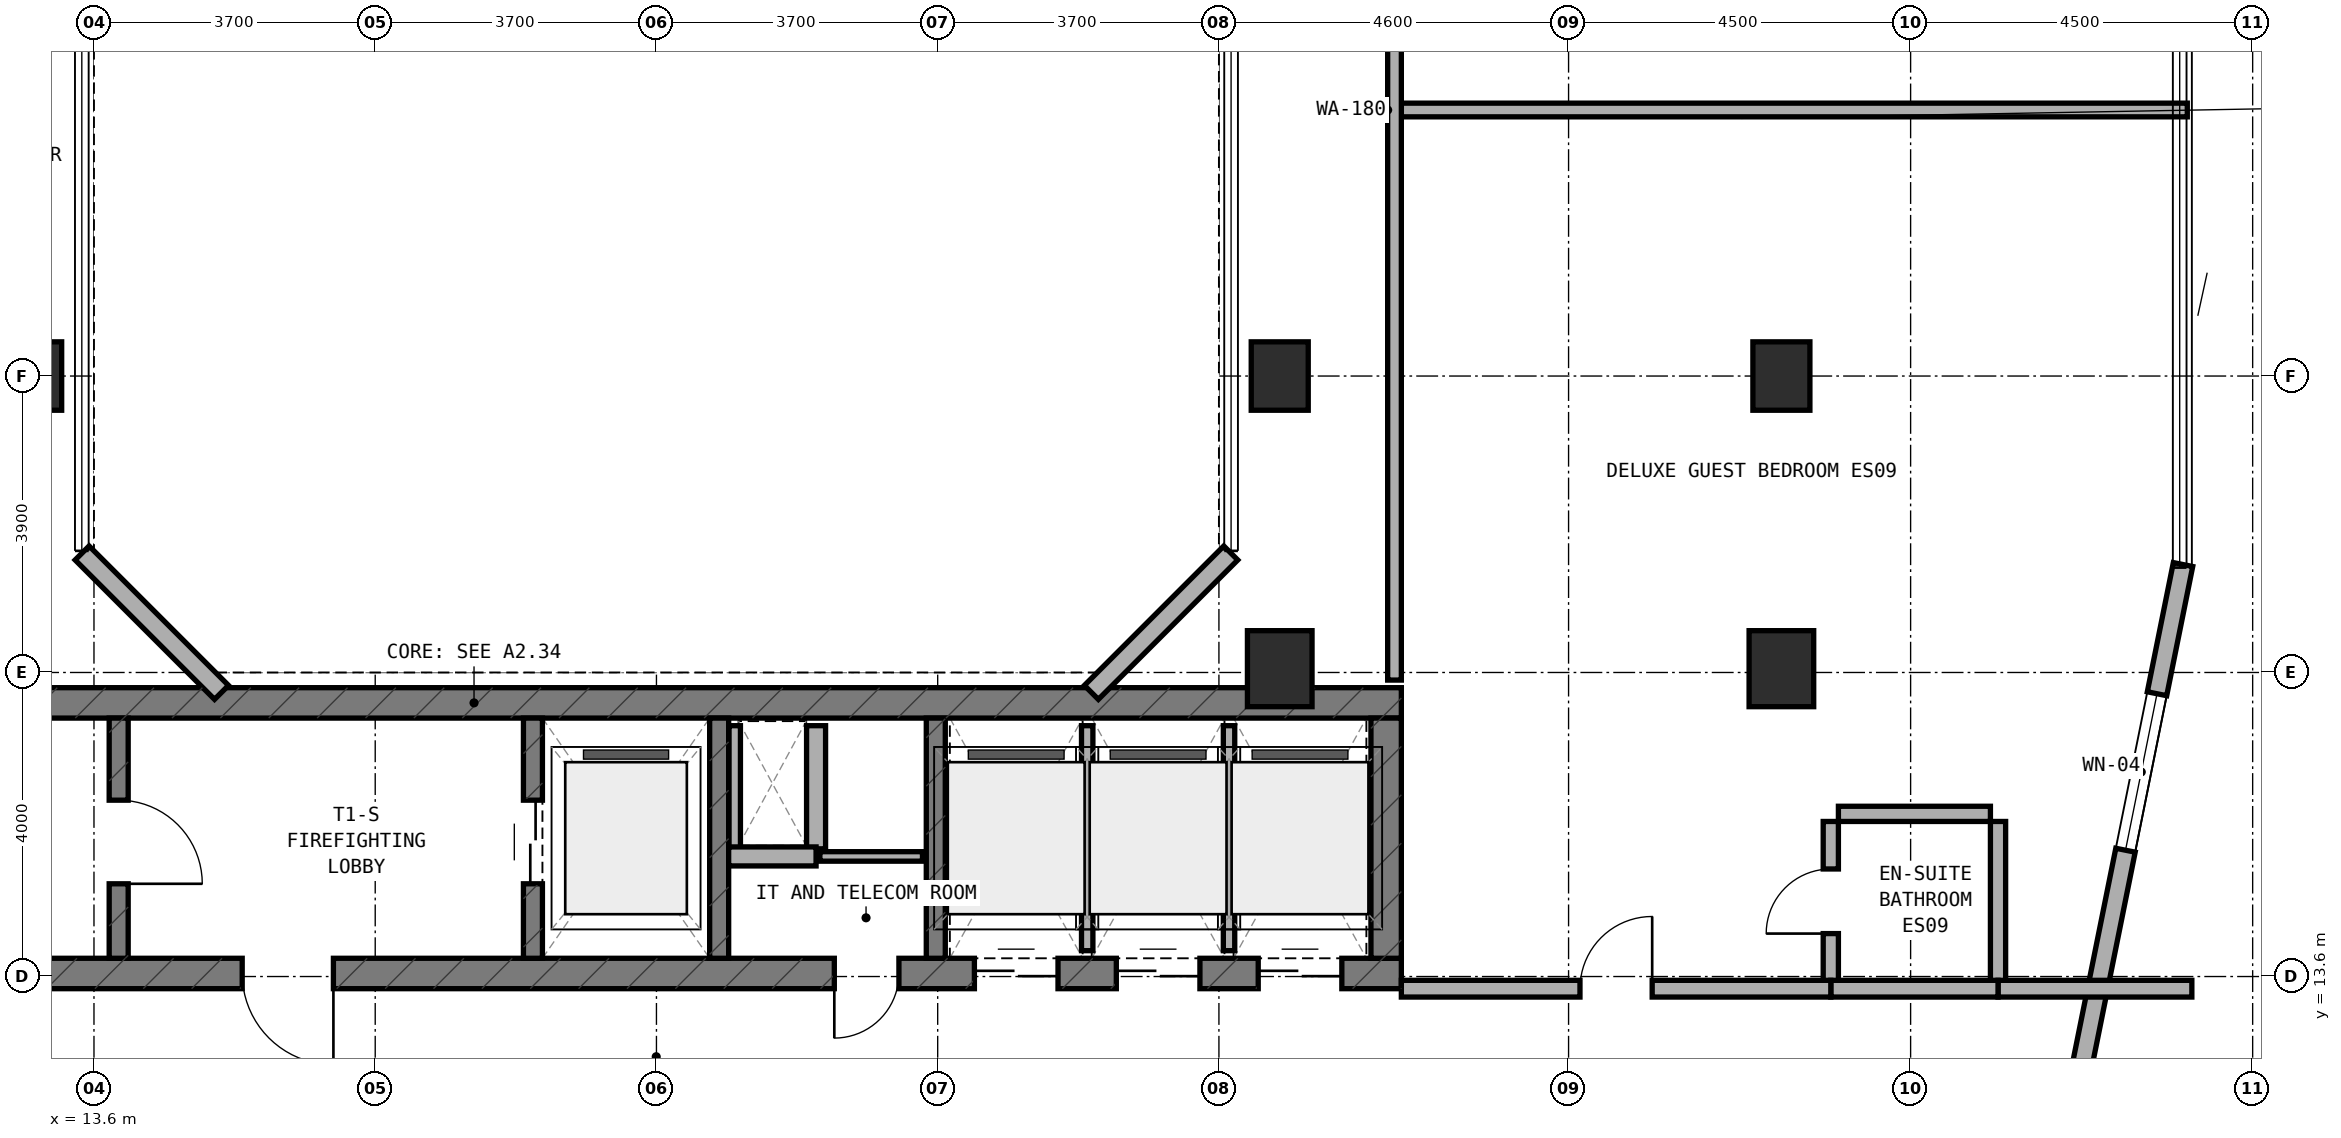
"""IFC4 building model, lengths in metres.
Left out: names, types, materials, properties, quantities, classifications, styles, units other than length and angle.
Written with IfcOpenShell. Run it as: python <this file> out.ifc"""

import sys

from ifc_helpers import new_model, si_unit, direction, frame, frame_2d, origin, origin_2d, place, context, subcontext, project, spatial, rectangle, extrude, element, fill, save


model = new_model("IFC4")
c1 = context("Model", 3, precision=1e-05, world=origin(), true_north=direction((0.0, 1.0)))
c2 = subcontext(c1, "Body", "Model", "MODEL_VIEW")
j1 = project(units=[si_unit("LENGTHUNIT", "METRE"), si_unit("PLANEANGLEUNIT", "RADIAN")], contexts=[c1])
p1 = place(None, origin())
s1 = spatial("IfcSite", under=j1, at=p1, CompositionType="ELEMENT")
p2 = place(p1, origin())
s2 = spatial("IfcBuilding", under=s1, at=p2, CompositionType="ELEMENT")
p3 = place(p2, frame((0.0, 0.0, 152.0)))
s3 = spatial("IfcBuildingStorey", under=s2, at=p3, CompositionType="ELEMENT", Elevation=152.0)
p4 = place(p3, frame((6.4, 13.64, 0.0), z_axis=(0.0, 0.0, 1.0), x_axis=(1.0, 0.0, 0.0)))
e1 = element("IfcWall", 1, at=p4, inside=s3, PredefinedType="SHEAR", context=c2, shape_type="SweptSolid", body=[
    extrude(rectangle(XDim=24.4, YDim=0.4, at=frame_2d((12.2, 0.0))), origin(), (0.0, 0.0, 1.0), 3.5),
])
p5 = place(p4, frame((9.15, 0.0, 0.0)))
e2 = element("IfcOpeningElement", 2, at=p5, cuts=e1, PredefinedType="OPENING", context=c2, shape_type="SweptSolid", body=[
    extrude(rectangle(XDim=1.2, YDim=2.15, at=frame_2d((0.6, 1.075))), frame((0.0, 0.21, 0.0), z_axis=(0.0, -1.0, 0.0), x_axis=(1.0, 0.0, 0.0)), (0.0, 0.0, 1.0), 0.42),
])
p6 = place(p4, frame((16.94, 0.0, 0.0)))
e3 = element("IfcOpeningElement", 3, at=p6, cuts=e1, PredefinedType="OPENING", context=c2, shape_type="SweptSolid", body=[
    extrude(rectangle(XDim=0.85, YDim=2.1, at=frame_2d((0.425, 1.05))), frame((0.0, 0.21, 0.0), z_axis=(0.0, -1.0, 0.0), x_axis=(1.0, 0.0, 0.0)), (0.0, 0.0, 1.0), 0.42),
])
p7 = place(p4, frame((18.783, 0.0, 0.0)))
e4 = element("IfcOpeningElement", 4, at=p7, cuts=e1, PredefinedType="OPENING", context=c2, shape_type="SweptSolid", body=[
    extrude(rectangle(XDim=1.1, YDim=2.15, at=frame_2d((0.55, 1.075))), frame((0.0, 0.21, 0.0), z_axis=(0.0, -1.0, 0.0), x_axis=(1.0, 0.0, 0.0)), (0.0, 0.0, 1.0), 0.42),
])
p8 = place(p4, frame((20.65, 0.0, 0.0)))
e5 = element("IfcOpeningElement", 5, at=p8, cuts=e1, PredefinedType="OPENING", context=c2, shape_type="SweptSolid", body=[
    extrude(rectangle(XDim=1.1, YDim=2.15, at=frame_2d((0.55, 1.075))), frame((0.0, 0.21, 0.0), z_axis=(0.0, -1.0, 0.0), x_axis=(1.0, 0.0, 0.0)), (0.0, 0.0, 1.0), 0.42),
])
p9 = place(p4, frame((22.517, 0.0, 0.0)))
e6 = element("IfcOpeningElement", 6, at=p9, cuts=e1, PredefinedType="OPENING", context=c2, shape_type="SweptSolid", body=[
    extrude(rectangle(XDim=1.1, YDim=2.15, at=frame_2d((0.55, 1.075))), frame((0.0, 0.21, 0.0), z_axis=(0.0, -1.0, 0.0), x_axis=(1.0, 0.0, 0.0)), (0.0, 0.0, 1.0), 0.42),
])
p10 = place(p3, frame((6.4, 17.2, 0.0), z_axis=(0.0, 0.0, 1.0), x_axis=(1.0, 0.0, 0.0)))
e7 = element("IfcWall", 7, at=p10, inside=s3, PredefinedType="SHEAR", context=c2, shape_type="SweptSolid", body=[
    extrude(rectangle(XDim=24.4, YDim=0.4, at=frame_2d((12.2, 0.0))), origin(), (0.0, 0.0, 1.0), 3.5),
])
p11 = place(p3, frame((30.6, 13.84, 0.0), z_axis=(0.0, 0.0, 1.0), x_axis=(0.0, 1.0, 0.0)))
e8 = element("IfcWall", 8, at=p11, inside=s3, PredefinedType="SHEAR", context=c2, shape_type="SweptSolid", body=[
    extrude(rectangle(XDim=3.16, YDim=0.4, at=frame_2d((1.58, 0.0))), origin(), (0.0, 0.0, 1.0), 3.5),
])
p12 = place(p3, frame((13.925, 13.84, 0.0), z_axis=(0.0, 0.0, 1.0), x_axis=(0.0, 1.0, 0.0)))
e9 = element("IfcWall", 9, at=p12, inside=s3, PredefinedType="STANDARD", context=c2, shape_type="SweptSolid", body=[
    extrude(rectangle(XDim=3.16, YDim=0.25, at=frame_2d((1.58, 0.0))), origin(), (0.0, 0.0, 1.0), 3.22),
])
p13 = place(p12, frame((0.98, 0.0, 0.0)))
e10 = element("IfcOpeningElement", 10, at=p13, cuts=e9, PredefinedType="OPENING", context=c2, shape_type="SweptSolid", body=[
    extrude(rectangle(XDim=1.1, YDim=2.15, at=frame_2d((0.55, 1.075))), frame((0.0, 0.135, 0.0), z_axis=(0.0, -1.0, 0.0), x_axis=(1.0, 0.0, 0.0)), (0.0, 0.0, 1.0), 0.27),
])
p14 = place(p3, frame((19.375, 13.84, 0.0), z_axis=(0.0, 0.0, 1.0), x_axis=(0.0, 1.0, 0.0)))
e11 = element("IfcWall", 11, at=p14, inside=s3, PredefinedType="STANDARD", context=c2, shape_type="SweptSolid", body=[
    extrude(rectangle(XDim=3.16, YDim=0.25, at=frame_2d((1.58, 0.0))), origin(), (0.0, 0.0, 1.0), 3.22),
])
p15 = place(p14, frame((0.98, 0.0, 0.0)))
e12 = element("IfcOpeningElement", 12, at=p15, cuts=e11, PredefinedType="OPENING", context=c2, shape_type="SweptSolid", body=[
    extrude(rectangle(XDim=1.1, YDim=2.15, at=frame_2d((0.55, 1.075))), frame((0.0, 0.135, 0.0), z_axis=(0.0, -1.0, 0.0), x_axis=(1.0, 0.0, 0.0)), (0.0, 0.0, 1.0), 0.27),
])
for number, where, z_axis, x_axis in (
    (13, (21.825, 13.84, 0.0), (0.0, 0.0, 1.0), (0.0, 1.0, 0.0)),
    (14, (24.675, 13.84, 0.0), (0.0, 0.0, 1.0), (0.0, 1.0, 0.0)),
):
    element("IfcWall", number, at=place(p3, frame(where, z_axis=z_axis, x_axis=x_axis)), inside=s3, PredefinedType="STANDARD", context=c2, shape_type="SweptSolid", body=[
        extrude(rectangle(XDim=3.16, YDim=0.25, at=frame_2d((1.58, 0.0))), origin(), (0.0, 0.0, 1.0), 3.22),
    ])
p16 = place(p3, frame((35.8, 21.5, 0.0), z_axis=(0.0, 0.0, 1.0), x_axis=(1.0, 0.0, 0.0)))
e15 = element("IfcColumn", 15, at=p16, inside=s3, PredefinedType="COLUMN", context=c2, shape_type="SweptSolid", body=[
    extrude(rectangle(XDim=0.75, YDim=0.9, at=origin_2d()), origin(), (0.0, 0.0, 1.0), 3.5),
])
p17 = place(p3, frame((35.8, 17.65, 0.0), z_axis=(0.0, 0.0, 1.0), x_axis=(1.0, 0.0, 0.0)))
e16 = element("IfcColumn", 16, at=p17, inside=s3, PredefinedType="COLUMN", context=c2, shape_type="SweptSolid", body=[
    extrude(rectangle(XDim=0.85, YDim=1.0, at=origin_2d()), origin(), (0.0, 0.0, 1.0), 3.5),
])
p18 = place(p3, frame((12.8, 21.5, 0.0), z_axis=(0.0, 0.0, 1.0), x_axis=(1.0, 0.0, 0.0)))
e17 = element("IfcColumn", 17, at=p18, inside=s3, PredefinedType="COLUMN", context=c2, shape_type="SweptSolid", body=[
    extrude(rectangle(XDim=0.75, YDim=0.9, at=origin_2d()), origin(), (0.0, 0.0, 1.0), 3.5),
])
p19 = place(p3, frame((29.2, 17.65, 0.0), z_axis=(0.0, 0.0, 1.0), x_axis=(1.0, 0.0, 0.0)))
e18 = element("IfcColumn", 18, at=p19, inside=s3, PredefinedType="COLUMN", context=c2, shape_type="SweptSolid", body=[
    extrude(rectangle(XDim=0.85, YDim=1.0, at=origin_2d()), origin(), (0.0, 0.0, 1.0), 3.5),
])
p20 = place(p3, frame((29.2, 21.5, 0.0), z_axis=(0.0, 0.0, 1.0), x_axis=(1.0, 0.0, 0.0)))
e19 = element("IfcColumn", 19, at=p20, inside=s3, PredefinedType="COLUMN", context=c2, shape_type="SweptSolid", body=[
    extrude(rectangle(XDim=0.75, YDim=0.9, at=origin_2d()), origin(), (0.0, 0.0, 1.0), 3.5),
])
p21 = place(p3, frame((39.271, 10.018, 0.0), z_axis=(0.0, 0.0, 1.0), x_axis=(0.197435082048, 0.980315963543, 0.0)))
e20 = element("IfcWall", 20, at=p21, inside=s3, PredefinedType="STANDARD", context=c2, shape_type="SweptSolid", body=[
    extrude(rectangle(XDim=9.183, YDim=0.26, at=frame_2d((4.591, 0.0))), origin(), (0.0, 0.0, 1.0), 3.22),
])
p22 = place(p21, frame((5.349, 0.0, 0.85)))
e21 = element("IfcOpeningElement", 21, at=p22, cuts=e20, PredefinedType="OPENING", context=c2, shape_type="SweptSolid", body=[
    extrude(rectangle(XDim=2.1, YDim=1.5, at=frame_2d((1.05, 0.75))), frame((0.0, 0.14, 0.0), z_axis=(0.0, -1.0, 0.0), x_axis=(1.0, 0.0, 0.0)), (0.0, 0.0, 1.0), 0.28),
])
for number, where, z_axis, x_axis in (
    (22, (26.722, 17.338, 0.0), (0.0, 0.0, 1.0), (0.707, 0.707, 0.0)),
    (23, (13.444, 19.172, 0.0), (0.0, 0.0, 1.0), (0.707, -0.707, 0.0)),
):
    element("IfcWall", number, at=place(p3, frame(where, z_axis=z_axis, x_axis=x_axis)), inside=s3, PredefinedType="STANDARD", context=c2, shape_type="SweptSolid", body=[
        extrude(rectangle(XDim=2.594, YDim=0.26, at=frame_2d((1.297, 0.0))), origin(), (0.0, 0.0, 1.0), 3.22),
    ])
p23 = place(p3, frame((22.03, 15.28, 0.0), z_axis=(0.0, 0.0, 1.0), x_axis=(0.0, 1.0, 0.0)))
e24 = element("IfcWall", 24, at=p23, inside=s3, PredefinedType="PARTITIONING", context=c2, shape_type="SweptSolid", body=[
    extrude(rectangle(XDim=1.62, YDim=0.15, at=frame_2d((0.81, 0.0))), origin(), (0.0, 0.0, 1.0), 3.22),
])
p24 = place(p3, frame((23.1, 15.28, 0.0), z_axis=(0.0, 0.0, 1.0), x_axis=(0.0, 1.0, 0.0)))
e25 = element("IfcWall", 25, at=p24, inside=s3, PredefinedType="SOLIDWALL", context=c2, shape_type="SweptSolid", body=[
    extrude(rectangle(XDim=1.62, YDim=0.25, at=frame_2d((0.81, 0.0))), origin(), (0.0, 0.0, 1.0), 3.22),
])
p25 = place(p3, frame((21.95, 15.18, 0.0), z_axis=(0.0, 0.0, 1.0), x_axis=(1.0, 0.0, 0.0)))
e26 = element("IfcWall", 26, at=p25, inside=s3, PredefinedType="SOLIDWALL", context=c2, shape_type="SweptSolid", body=[
    extrude(rectangle(XDim=1.15, YDim=0.25, at=frame_2d((0.575, 0.0))), origin(), (0.0, 0.0, 1.0), 3.22),
])
p26 = place(p3, frame((23.15, 15.18, 0.0), z_axis=(0.0, 0.0, 1.0), x_axis=(1.0, 0.0, 0.0)))
e27 = element("IfcWall", 27, at=p26, inside=s3, PredefinedType="PARTITIONING", context=c2, shape_type="SweptSolid", body=[
    extrude(rectangle(XDim=1.35, YDim=0.125, at=frame_2d((0.675, 0.0))), origin(), (0.0, 0.0, 1.0), 3.22),
])
p27 = place(p3, frame((26.667, 13.94, 0.0), z_axis=(0.0, 0.0, 1.0), x_axis=(0.0, 1.0, 0.0)))
e28 = element("IfcWall", 28, at=p27, inside=s3, PredefinedType="PARTITIONING", context=c2, shape_type="SweptSolid", body=[
    extrude(rectangle(XDim=2.96, YDim=0.15, at=frame_2d((1.48, 0.0))), origin(), (0.0, 0.0, 1.0), 3.22),
])
p28 = place(p3, frame((28.533, 13.94, 0.0), z_axis=(0.0, 0.0, 1.0), x_axis=(0.0, 1.0, 0.0)))
e29 = element("IfcWall", 29, at=p28, inside=s3, PredefinedType="PARTITIONING", context=c2, shape_type="SweptSolid", body=[
    extrude(rectangle(XDim=2.96, YDim=0.15, at=frame_2d((1.48, 0.0))), origin(), (0.0, 0.0, 1.0), 2.795),
])
p29 = place(p3, frame((30.8, 25.0, 0.0), z_axis=(0.0, 0.0, 1.0), x_axis=(1.0, 0.0, 0.0)))
e30 = element("IfcWall", 30, at=p29, inside=s3, PredefinedType="SOLIDWALL", context=c2, shape_type="SweptSolid", body=[
    extrude(rectangle(XDim=10.34, YDim=0.18, at=frame_2d((5.17, 0.0))), origin(), (0.0, 0.0, 1.0), 2.835),
])
p30 = place(p3, frame((30.71, 17.5, 0.0), z_axis=(0.0, 0.0, 1.0), x_axis=(0.0, 1.0, 0.0)))
e31 = element("IfcWall", 31, at=p30, inside=s3, PredefinedType="SOLIDWALL", context=c2, shape_type="SweptSolid", body=[
    extrude(rectangle(XDim=15.0, YDim=0.18, at=frame_2d((7.5, 0.0))), origin(), (0.0, 0.0, 1.0), 2.795),
])
p31 = place(p3, frame((36.45, 13.54, 0.0), z_axis=(0.0, 0.0, 1.0), x_axis=(0.0, 1.0, 0.0)))
e32 = element("IfcWall", 32, at=p31, inside=s3, PredefinedType="PLUMBINGWALL", context=c2, shape_type="SweptSolid", body=[
    extrude(rectangle(XDim=2.1, YDim=0.2, at=frame_2d((1.05, 0.0))), origin(), (0.0, 0.0, 1.0), 3.22),
])
p32 = place(p31, frame((0.625, 0.0, 0.0)))
e33 = element("IfcOpeningElement", 33, at=p32, cuts=e32, PredefinedType="OPENING", context=c2, shape_type="SweptSolid", body=[
    extrude(rectangle(XDim=0.85, YDim=2.1, at=frame_2d((0.425, 1.05))), frame((0.0, 0.11, 0.0), z_axis=(0.0, -1.0, 0.0), x_axis=(1.0, 0.0, 0.0)), (0.0, 0.0, 1.0), 0.22),
])
p33 = place(p3, frame((36.55, 15.74, 0.0), z_axis=(0.0, 0.0, 1.0), x_axis=(1.0, 0.0, 0.0)))
e34 = element("IfcWall", 34, at=p33, inside=s3, PredefinedType="PLUMBINGWALL", context=c2, shape_type="SweptSolid", body=[
    extrude(rectangle(XDim=2.0, YDim=0.2, at=frame_2d((1.0, 0.0))), origin(), (0.0, 0.0, 1.0), 3.22),
])
p34 = place(p3, frame((38.65, 13.54, 0.0), z_axis=(0.0, 0.0, 1.0), x_axis=(0.0, 1.0, 0.0)))
e35 = element("IfcWall", 35, at=p34, inside=s3, PredefinedType="PLUMBINGWALL", context=c2, shape_type="SweptSolid", body=[
    extrude(rectangle(XDim=2.1, YDim=0.2, at=frame_2d((1.05, 0.0))), origin(), (0.0, 0.0, 1.0), 3.22),
])
p35 = place(p3, frame((38.65, 13.44, 0.0), z_axis=(0.0, 0.0, 1.0), x_axis=(1.0, 0.0, 0.0)))
e36 = element("IfcWall", 36, at=p35, inside=s3, PredefinedType="SOLIDWALL", context=c2, shape_type="SweptSolid", body=[
    extrude(rectangle(XDim=2.55, YDim=0.22, at=frame_2d((1.275, 0.0))), origin(), (0.0, 0.0, 1.0), 3.22),
])
p36 = place(p3, frame((36.45, 13.44, 0.0), z_axis=(0.0, 0.0, 1.0), x_axis=(1.0, 0.0, 0.0)))
e37 = element("IfcWall", 37, at=p36, inside=s3, PredefinedType="SOLIDWALL", context=c2, shape_type="SweptSolid", body=[
    extrude(rectangle(XDim=2.2, YDim=0.22, at=frame_2d((1.1, 0.0))), origin(), (0.0, 0.0, 1.0), 3.22),
])
p37 = place(p3, frame((30.8, 13.44, 0.0), z_axis=(0.0, 0.0, 1.0), x_axis=(1.0, 0.0, 0.0)))
e38 = element("IfcWall", 38, at=p37, inside=s3, PredefinedType="SOLIDWALL", context=c2, shape_type="SweptSolid", body=[
    extrude(rectangle(XDim=5.65, YDim=0.22, at=frame_2d((2.825, 0.0))), origin(), (0.0, 0.0, 1.0), 2.795),
])
p38 = place(p37, frame((2.35, 0.0, 0.0)))
e39 = element("IfcOpeningElement", 39, at=p38, cuts=e38, PredefinedType="OPENING", context=c2, shape_type="SweptSolid", body=[
    extrude(rectangle(XDim=0.95, YDim=2.1, at=frame_2d((0.475, 1.05))), frame((0.0, 0.12, 0.0), z_axis=(0.0, -1.0, 0.0), x_axis=(1.0, 0.0, 0.0)), (0.0, 0.0, 1.0), 0.24),
])
p39 = place(p22, origin())
e40 = element("IfcWindow", 40, at=p39, inside=s3, PartitioningType="SINGLE_PANEL", PredefinedType="WINDOW", context=c2, shape_type="SweptSolid", body=[
    extrude(rectangle(XDim=2.1, YDim=1.5, at=frame_2d((1.05, 0.75))), frame((0.0, 0.03, 0.0), z_axis=(0.0, -1.0, 0.0), x_axis=(1.0, 0.0, 0.0)), (0.0, 0.0, 1.0), 0.06),
])
fill(e21, e40)
p40 = place(p13, frame((1.1, 0.0, 0.0), z_axis=(0.0, 0.0, 1.0), x_axis=(-1.0, 0.0, 0.0)))
e41 = element("IfcDoor", 41, at=p40, inside=s3, OperationType="SINGLE_SWING_RIGHT", PredefinedType="DOOR", context=c2, shape_type="SweptSolid", body=[
    extrude(rectangle(XDim=1.1, YDim=2.15, at=frame_2d((0.55, 1.075))), frame((0.0, 0.025, 0.0), z_axis=(0.0, -1.0, 0.0), x_axis=(1.0, 0.0, 0.0)), (0.0, 0.0, 1.0), 0.05),
])
fill(e10, e41)
p41 = place(p5, frame((1.2, 0.0, 0.0), z_axis=(0.0, 0.0, 1.0), x_axis=(-1.0, 0.0, 0.0)))
e42 = element("IfcDoor", 42, at=p41, inside=s3, OperationType="SINGLE_SWING_LEFT", PredefinedType="DOOR", context=c2, shape_type="SweptSolid", body=[
    extrude(rectangle(XDim=1.2, YDim=2.15, at=frame_2d((0.6, 1.075))), frame((0.0, 0.025, 0.0), z_axis=(0.0, -1.0, 0.0), x_axis=(1.0, 0.0, 0.0)), (0.0, 0.0, 1.0), 0.05),
])
fill(e2, e42)
p42 = place(p15, origin())
e43 = element("IfcDoor", 43, at=p42, inside=s3, OperationType="DOUBLE_DOOR_SLIDING", PredefinedType="DOOR", context=c2, shape_type="SweptSolid", body=[
    extrude(rectangle(XDim=1.1, YDim=2.15, at=frame_2d((0.55, 1.075))), frame((0.0, 0.025, 0.0), z_axis=(0.0, -1.0, 0.0), x_axis=(1.0, 0.0, 0.0)), (0.0, 0.0, 1.0), 0.05),
])
fill(e12, e43)
p43 = place(p6, frame((0.85, 0.0, 0.0), z_axis=(0.0, 0.0, 1.0), x_axis=(-1.0, 0.0, 0.0)))
e44 = element("IfcDoor", 44, at=p43, inside=s3, OperationType="SINGLE_SWING_RIGHT", PredefinedType="DOOR", context=c2, shape_type="SweptSolid", body=[
    extrude(rectangle(XDim=0.85, YDim=2.1, at=frame_2d((0.425, 1.05))), frame((0.0, 0.025, 0.0), z_axis=(0.0, -1.0, 0.0), x_axis=(1.0, 0.0, 0.0)), (0.0, 0.0, 1.0), 0.05),
])
fill(e3, e44)
p44 = place(p7, frame((1.1, 0.0, 0.0), z_axis=(0.0, 0.0, 1.0), x_axis=(-1.0, 0.0, 0.0)))
e45 = element("IfcDoor", 45, at=p44, inside=s3, OperationType="DOUBLE_DOOR_SLIDING", PredefinedType="DOOR", context=c2, shape_type="SweptSolid", body=[
    extrude(rectangle(XDim=1.1, YDim=2.15, at=frame_2d((0.55, 1.075))), frame((0.0, 0.025, 0.0), z_axis=(0.0, -1.0, 0.0), x_axis=(1.0, 0.0, 0.0)), (0.0, 0.0, 1.0), 0.05),
])
fill(e4, e45)
p45 = place(p8, frame((1.1, 0.0, 0.0), z_axis=(0.0, 0.0, 1.0), x_axis=(-1.0, 0.0, 0.0)))
e46 = element("IfcDoor", 46, at=p45, inside=s3, OperationType="DOUBLE_DOOR_SLIDING", PredefinedType="DOOR", context=c2, shape_type="SweptSolid", body=[
    extrude(rectangle(XDim=1.1, YDim=2.15, at=frame_2d((0.55, 1.075))), frame((0.0, 0.025, 0.0), z_axis=(0.0, -1.0, 0.0), x_axis=(1.0, 0.0, 0.0)), (0.0, 0.0, 1.0), 0.05),
])
fill(e5, e46)
p46 = place(p9, frame((1.1, 0.0, 0.0), z_axis=(0.0, 0.0, 1.0), x_axis=(-1.0, 0.0, 0.0)))
e47 = element("IfcDoor", 47, at=p46, inside=s3, OperationType="DOUBLE_DOOR_SLIDING", PredefinedType="DOOR", context=c2, shape_type="SweptSolid", body=[
    extrude(rectangle(XDim=1.1, YDim=2.15, at=frame_2d((0.55, 1.075))), frame((0.0, 0.025, 0.0), z_axis=(0.0, -1.0, 0.0), x_axis=(1.0, 0.0, 0.0)), (0.0, 0.0, 1.0), 0.05),
])
fill(e6, e47)
p47 = place(p32, origin())
e48 = element("IfcDoor", 48, at=p47, inside=s3, OperationType="SINGLE_SWING_LEFT", PredefinedType="DOOR", context=c2, shape_type="SweptSolid", body=[
    extrude(rectangle(XDim=0.85, YDim=2.1, at=frame_2d((0.425, 1.05))), frame((0.0, 0.025, 0.0), z_axis=(0.0, -1.0, 0.0), x_axis=(1.0, 0.0, 0.0)), (0.0, 0.0, 1.0), 0.05),
])
fill(e33, e48)
p48 = place(p38, origin())
e49 = element("IfcDoor", 49, at=p48, inside=s3, OperationType="SINGLE_SWING_RIGHT", PredefinedType="DOOR", context=c2, shape_type="SweptSolid", body=[
    extrude(rectangle(XDim=0.95, YDim=2.1, at=frame_2d((0.475, 1.05))), frame((0.0, 0.025, 0.0), z_axis=(0.0, -1.0, 0.0), x_axis=(1.0, 0.0, 0.0)), (0.0, 0.0, 1.0), 0.05),
])
fill(e39, e49)
save(model, sys.argv[1])
